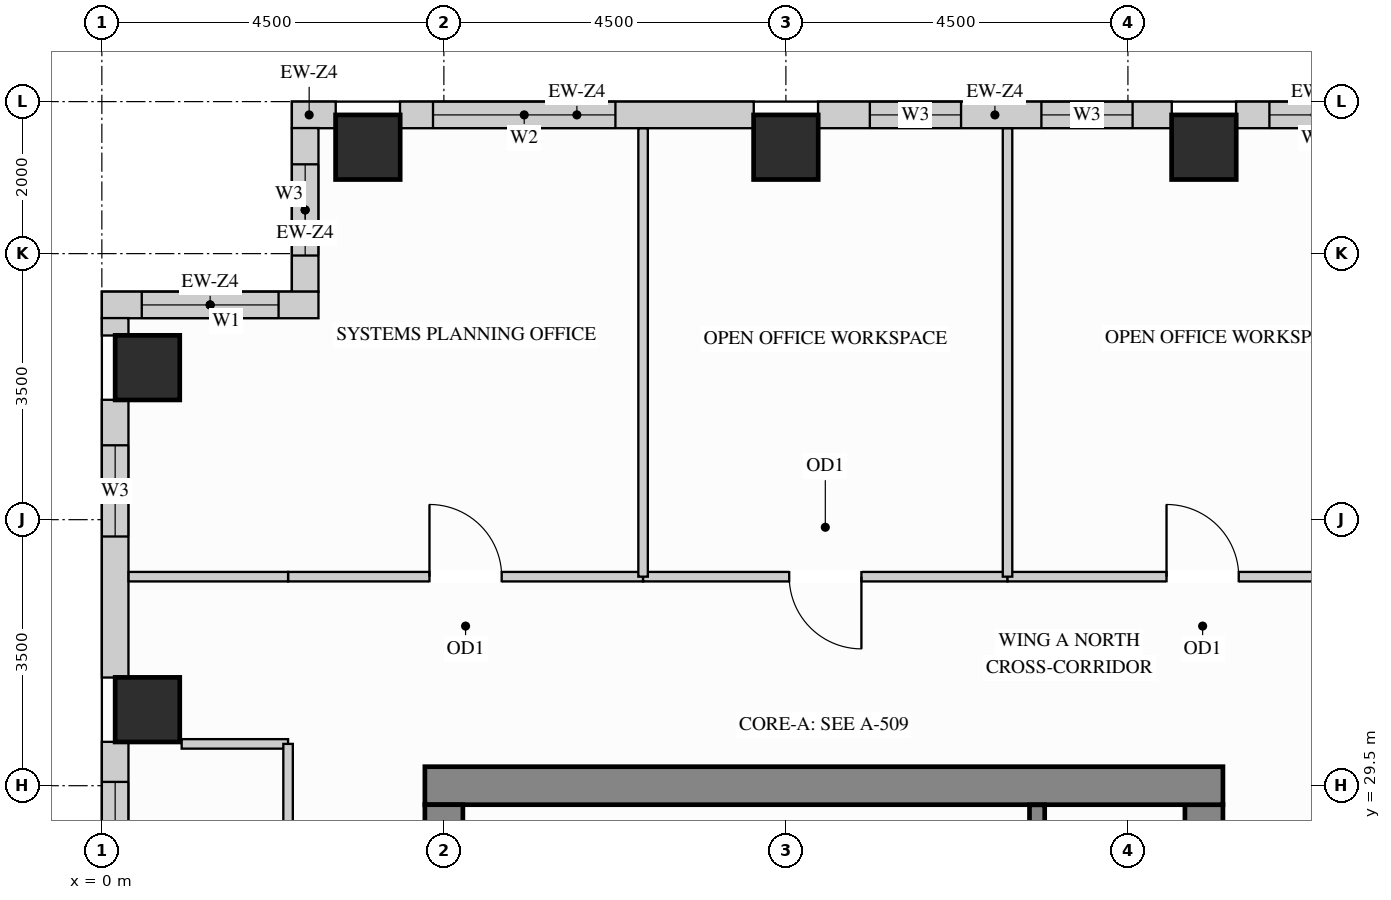
"""IFC4 building model, lengths in metres.
Left out: names, types, materials, properties, quantities, classifications, styles, units other than length and angle.
Written with IfcOpenShell. Run it as: python <this file> out.ifc"""

import sys

from ifc_helpers import new_model, si_unit, direction, frame, frame_2d, origin, origin_2d, place, context, subcontext, project, spatial, rectangle, extrude, source, transform, mapped, element, fill, save


model = new_model("IFC4")
c1 = context("Model", 3, precision=1e-05, world=origin(), true_north=direction((0.0, 1.0)))
c2 = subcontext(c1, "Body", "Model", "MODEL_VIEW")
j1 = project(units=[si_unit("LENGTHUNIT", "METRE"), si_unit("PLANEANGLEUNIT", "RADIAN")], contexts=[c1])
p1 = place(None, origin())
s1 = spatial("IfcSite", under=j1, at=p1, CompositionType="ELEMENT")
p2 = place(p1, origin())
s2 = spatial("IfcBuilding", under=s1, at=p2, CompositionType="ELEMENT")
p3 = place(p2, frame((0.0, 0.0, 237.6)))
s3 = spatial("IfcBuildingStorey", under=s2, at=p3, CompositionType="ELEMENT", Elevation=237.6)
m1 = source(origin(), c2, "Body", "SweptSolid", [
    extrude(rectangle(XDim=0.85, YDim=0.85, at=origin_2d()), origin(), (0.0, 0.0, 1.0), 3.4),
])
for number, where, z_axis, x_axis in (
    (1, (14.5, 37.9, 0.0), (0.0, 0.0, 1.0), (1.0, 0.0, 0.0)),
    (2, (3.5, 37.9, 0.0), (0.0, 0.0, 1.0), (1.0, 0.0, 0.0)),
    (3, (9.0, 37.9, 0.0), (0.0, 0.0, 1.0), (1.0, 0.0, 0.0)),
    (4, (0.6, 30.5, 0.0), (0.0, 0.0, 1.0), (1.0, 0.0, 0.0)),
    (5, (0.6, 35.0, 0.0), (0.0, 0.0, 1.0), (1.0, 0.0, 0.0)),
):
    element("IfcColumn", number, at=place(p3, frame(where, z_axis=z_axis, x_axis=x_axis)), inside=s3, PredefinedType="COLUMN", context=c2, shape_type="MappedRepresentation", body=[
        mapped(m1, transform((0.0, 0.0, 0.0), x_axis=(1.0, 0.0, 0.0), y_axis=(0.0, 1.0, 0.0), z_axis=(0.0, 0.0, 1.0))),
    ])
m2 = source(origin(), c2, "Body", "SweptSolid", [
    extrude(rectangle(XDim=8.37, YDim=0.5, at=frame_2d((4.185, 0.0))), origin(), (0.0, 0.0, 1.0), 3.4),
])
p4 = place(p3, frame((14.5, 20.88, 0.0), z_axis=(0.0, 0.0, 1.0), x_axis=(0.0, 1.0, 0.0)))
e6 = element("IfcWall", 6, at=p4, inside=s3, PredefinedType="SHEAR", context=c2, shape_type="MappedRepresentation", body=[
    mapped(m2, transform((0.0, 0.0, 0.0), x_axis=(1.0, 0.0, 0.0), y_axis=(0.0, 1.0, 0.0), z_axis=(0.0, 0.0, 1.0))),
])
m3 = source(origin(), c2, "Body", "SweptSolid", [
    extrude(rectangle(XDim=10.5, YDim=0.5, at=frame_2d((5.25, 0.0))), origin(), (0.0, 0.0, 1.0), 3.4),
])
p5 = place(p3, frame((4.25, 29.5, 0.0), z_axis=(0.0, 0.0, 1.0), x_axis=(1.0, 0.0, 0.0)))
e7 = element("IfcWall", 7, at=p5, inside=s3, PredefinedType="SHEAR", context=c2, shape_type="MappedRepresentation", body=[
    mapped(m3, transform((0.0, 0.0, 0.0), x_axis=(1.0, 0.0, 0.0), y_axis=(0.0, 1.0, 0.0), z_axis=(0.0, 0.0, 1.0))),
])
m4 = source(origin(), c2, "Body", "SweptSolid", [
    extrude(rectangle(XDim=20.5, YDim=0.5, at=frame_2d((10.25, 0.0))), origin(), (0.0, 0.0, 1.0), 3.4),
])
p6 = place(p3, frame((4.5, 8.75, 0.0), z_axis=(0.0, 0.0, 1.0), x_axis=(0.0, 1.0, 0.0)))
e8 = element("IfcWall", 8, at=p6, inside=s3, PredefinedType="SHEAR", context=c2, shape_type="MappedRepresentation", body=[
    mapped(m4, transform((0.0, 0.0, 0.0), x_axis=(1.0, 0.0, 0.0), y_axis=(0.0, 1.0, 0.0), z_axis=(0.0, 0.0, 1.0))),
])
p7 = place(p3, frame((17.0, 38.325, 0.0), z_axis=(0.0, 0.0, 1.0), x_axis=(-1.0, 0.0, 0.0)))
e9 = element("IfcWall", 9, at=p7, inside=s3, PredefinedType="SOLIDWALL", context=c2, shape_type="SweptSolid", body=[
    extrude(rectangle(XDim=2.077, YDim=0.35, at=frame_2d((1.039, 0.0))), origin(), (0.0, 0.0, 1.0), 3.385),
])
p8 = place(p7, frame((0.438, 0.0, 0.78)))
e10 = element("IfcOpeningElement", 10, at=p8, cuts=e9, PredefinedType="OPENING", context=c2, shape_type="SweptSolid", body=[
    extrude(rectangle(XDim=1.2, YDim=2.1, at=frame_2d((0.6, 1.05))), frame((0.0, 0.185, 0.0), z_axis=(0.0, -1.0, 0.0), x_axis=(1.0, 0.0, 0.0)), (0.0, 0.0, 1.0), 0.37),
])
p9 = place(p3, frame((14.077, 38.325, 0.0), z_axis=(0.0, 0.0, 1.0), x_axis=(-1.0, 0.0, 0.0)))
e11 = element("IfcWall", 11, at=p9, inside=s3, PredefinedType="SOLIDWALL", context=c2, shape_type="SweptSolid", body=[
    extrude(rectangle(XDim=4.654, YDim=0.35, at=frame_2d((2.327, 0.0))), origin(), (0.0, 0.0, 1.0), 3.385),
])
p10 = place(p9, frame((0.515, 0.0, 0.78)))
e12 = element("IfcOpeningElement", 12, at=p10, cuts=e11, PredefinedType="OPENING", context=c2, shape_type="SweptSolid", body=[
    extrude(rectangle(XDim=1.2, YDim=2.1, at=frame_2d((0.6, 1.05))), frame((0.0, 0.185, 0.0), z_axis=(0.0, -1.0, 0.0), x_axis=(1.0, 0.0, 0.0)), (0.0, 0.0, 1.0), 0.37),
])
p11 = place(p9, frame((2.772, 0.0, 0.78)))
e13 = element("IfcOpeningElement", 13, at=p11, cuts=e11, PredefinedType="OPENING", context=c2, shape_type="SweptSolid", body=[
    extrude(rectangle(XDim=1.2, YDim=2.1, at=frame_2d((0.6, 1.05))), frame((0.0, 0.185, 0.0), z_axis=(0.0, -1.0, 0.0), x_axis=(1.0, 0.0, 0.0)), (0.0, 0.0, 1.0), 0.37),
])
p12 = place(p3, frame((8.577, 38.325, 0.0), z_axis=(0.0, 0.0, 1.0), x_axis=(-1.0, 0.0, 0.0)))
e14 = element("IfcWall", 14, at=p12, inside=s3, PredefinedType="SOLIDWALL", context=c2, shape_type="SweptSolid", body=[
    extrude(rectangle(XDim=4.654, YDim=0.35, at=frame_2d((2.327, 0.0))), origin(), (0.0, 0.0, 1.0), 3.385),
])
p13 = place(p12, frame((1.82, 0.0, 0.78)))
e15 = element("IfcOpeningElement", 15, at=p13, cuts=e14, PredefinedType="OPENING", context=c2, shape_type="SweptSolid", body=[
    extrude(rectangle(XDim=2.4, YDim=2.1, at=frame_2d((1.2, 1.05))), frame((0.0, 0.185, 0.0), z_axis=(0.0, -1.0, 0.0), x_axis=(1.0, 0.0, 0.0)), (0.0, 0.0, 1.0), 0.37),
])
m5 = source(origin(), c2, "Body", "SweptSolid", [
    extrude(rectangle(XDim=0.577, YDim=0.35, at=frame_2d((0.289, 0.0))), origin(), (0.0, 0.0, 1.0), 3.385),
])
p14 = place(p3, frame((3.077, 38.325, 0.0), z_axis=(0.0, 0.0, 1.0), x_axis=(-1.0, 0.0, 0.0)))
e16 = element("IfcWall", 16, at=p14, inside=s3, PredefinedType="SOLIDWALL", context=c2, shape_type="MappedRepresentation", body=[
    mapped(m5, transform((0.0, 0.0, 0.0), x_axis=(1.0, 0.0, 0.0), y_axis=(0.0, 1.0, 0.0), z_axis=(0.0, 0.0, 1.0))),
])
p15 = place(p3, frame((2.675, 38.152, 0.0), z_axis=(0.0, 0.0, 1.0), x_axis=(0.0, -1.0, 0.0)))
e17 = element("IfcWall", 17, at=p15, inside=s3, PredefinedType="SOLIDWALL", context=c2, shape_type="SweptSolid", body=[
    extrude(rectangle(XDim=2.154, YDim=0.35, at=frame_2d((1.077, 0.0))), origin(), (0.0, 0.0, 1.0), 3.385),
])
p16 = place(p15, frame((0.477, 0.0, 0.78)))
e18 = element("IfcOpeningElement", 18, at=p16, cuts=e17, PredefinedType="OPENING", context=c2, shape_type="SweptSolid", body=[
    extrude(rectangle(XDim=1.2, YDim=2.1, at=frame_2d((0.6, 1.05))), frame((0.0, 0.185, 0.0), z_axis=(0.0, -1.0, 0.0), x_axis=(1.0, 0.0, 0.0)), (0.0, 0.0, 1.0), 0.37),
])
p17 = place(p3, frame((2.85, 35.825, 0.0), z_axis=(0.0, 0.0, 1.0), x_axis=(-1.0, 0.0, 0.0)))
e19 = element("IfcWall", 19, at=p17, inside=s3, PredefinedType="SOLIDWALL", context=c2, shape_type="SweptSolid", body=[
    extrude(rectangle(XDim=2.85, YDim=0.35, at=frame_2d((1.425, 0.0))), origin(), (0.0, 0.0, 1.0), 3.385),
])
p18 = place(p17, frame((0.525, 0.0, 0.78)))
e20 = element("IfcOpeningElement", 20, at=p18, cuts=e19, PredefinedType="OPENING", context=c2, shape_type="SweptSolid", body=[
    extrude(rectangle(XDim=1.8, YDim=2.1, at=frame_2d((0.9, 1.05))), frame((0.0, 0.185, 0.0), z_axis=(0.0, -1.0, 0.0), x_axis=(1.0, 0.0, 0.0)), (0.0, 0.0, 1.0), 0.37),
])
m6 = source(origin(), c2, "Body", "SweptSolid", [
    extrude(rectangle(XDim=0.229, YDim=0.35, at=frame_2d((0.115, 0.0))), origin(), (0.0, 0.0, 1.0), 3.385),
])
p19 = place(p3, frame((0.175, 35.652, 0.0), z_axis=(0.0, 0.0, 1.0), x_axis=(0.0, -1.0, 0.0)))
e21 = element("IfcWall", 21, at=p19, inside=s3, PredefinedType="SOLIDWALL", context=c2, shape_type="MappedRepresentation", body=[
    mapped(m6, transform((0.0, 0.0, 0.0), x_axis=(1.0, 0.0, 0.0), y_axis=(0.0, 1.0, 0.0), z_axis=(0.0, 0.0, 1.0))),
])
p20 = place(p3, frame((0.175, 34.577, 0.0), z_axis=(0.0, 0.0, 1.0), x_axis=(0.0, -1.0, 0.0)))
e22 = element("IfcWall", 22, at=p20, inside=s3, PredefinedType="SOLIDWALL", context=c2, shape_type="SweptSolid", body=[
    extrude(rectangle(XDim=3.654, YDim=0.35, at=frame_2d((1.827, 0.0))), origin(), (0.0, 0.0, 1.0), 3.385),
])
p21 = place(p20, frame((0.598, 0.0, 0.78)))
e23 = element("IfcOpeningElement", 23, at=p21, cuts=e22, PredefinedType="OPENING", context=c2, shape_type="SweptSolid", body=[
    extrude(rectangle(XDim=1.2, YDim=2.1, at=frame_2d((0.6, 1.05))), frame((0.0, 0.185, 0.0), z_axis=(0.0, -1.0, 0.0), x_axis=(1.0, 0.0, 0.0)), (0.0, 0.0, 1.0), 0.37),
])
p22 = place(p3, frame((0.175, 30.077, 0.0), z_axis=(0.0, 0.0, 1.0), x_axis=(0.0, -1.0, 0.0)))
e24 = element("IfcWall", 24, at=p22, inside=s3, PredefinedType="SOLIDWALL", context=c2, shape_type="SweptSolid", body=[
    extrude(rectangle(XDim=2.854, YDim=0.35, at=frame_2d((1.427, 0.0))), origin(), (0.0, 0.0, 1.0), 3.385),
])
p23 = place(p22, frame((0.527, 0.0, 0.78)))
e25 = element("IfcOpeningElement", 25, at=p23, cuts=e24, PredefinedType="OPENING", context=c2, shape_type="SweptSolid", body=[
    extrude(rectangle(XDim=1.8, YDim=2.1, at=frame_2d((0.9, 1.05))), frame((0.0, 0.185, 0.0), z_axis=(0.0, -1.0, 0.0), x_axis=(1.0, 0.0, 0.0)), (0.0, 0.0, 1.0), 0.37),
])
p24 = place(p3, frame((2.45, 32.25, 0.0), z_axis=(0.0, 0.0, 1.0), x_axis=(1.0, 0.0, 0.0)))
e26 = element("IfcWall", 26, at=p24, inside=s3, PredefinedType="PARTITIONING", context=c2, shape_type="SweptSolid", body=[
    extrude(rectangle(XDim=4.671, YDim=0.125, at=frame_2d((2.335, 0.0))), origin(), (0.0, 0.0, 1.0), 3.385),
])
p25 = place(p24, frame((1.861, 0.0, 0.0)))
e27 = element("IfcOpeningElement", 27, at=p25, cuts=e26, PredefinedType="OPENING", context=c2, shape_type="SweptSolid", body=[
    extrude(rectangle(XDim=0.95, YDim=2.15, at=frame_2d((0.475, 1.075))), frame((0.0, 0.073, 0.0), z_axis=(0.0, -1.0, 0.0), x_axis=(1.0, 0.0, 0.0)), (0.0, 0.0, 1.0), 0.145),
])
p26 = place(p3, frame((7.121, 32.25, 0.0), z_axis=(0.0, 0.0, 1.0), x_axis=(1.0, 0.0, 0.0)))
e28 = element("IfcWall", 28, at=p26, inside=s3, PredefinedType="PARTITIONING", context=c2, shape_type="SweptSolid", body=[
    extrude(rectangle(XDim=4.795, YDim=0.125, at=frame_2d((2.397, 0.0))), origin(), (0.0, 0.0, 1.0), 3.385),
])
p27 = place(p26, frame((1.923, 0.0, 0.0)))
e29 = element("IfcOpeningElement", 29, at=p27, cuts=e28, PredefinedType="OPENING", context=c2, shape_type="SweptSolid", body=[
    extrude(rectangle(XDim=0.95, YDim=2.15, at=frame_2d((0.475, 1.075))), frame((0.0, 0.073, 0.0), z_axis=(0.0, -1.0, 0.0), x_axis=(1.0, 0.0, 0.0)), (0.0, 0.0, 1.0), 0.145),
])
p28 = place(p3, frame((11.916, 32.25, 0.0), z_axis=(0.0, 0.0, 1.0), x_axis=(1.0, 0.0, 0.0)))
e30 = element("IfcWall", 30, at=p28, inside=s3, PredefinedType="PARTITIONING", context=c2, shape_type="SweptSolid", body=[
    extrude(rectangle(XDim=5.134, YDim=0.125, at=frame_2d((2.567, 0.0))), origin(), (0.0, 0.0, 1.0), 3.385),
])
p29 = place(p28, frame((2.092, 0.0, 0.0)))
e31 = element("IfcOpeningElement", 31, at=p29, cuts=e30, PredefinedType="OPENING", context=c2, shape_type="SweptSolid", body=[
    extrude(rectangle(XDim=0.95, YDim=2.15, at=frame_2d((0.475, 1.075))), frame((0.0, 0.073, 0.0), z_axis=(0.0, -1.0, 0.0), x_axis=(1.0, 0.0, 0.0)), (0.0, 0.0, 1.0), 0.145),
])
m7 = source(origin(), c2, "Body", "SweptSolid", [
    extrude(rectangle(XDim=2.098, YDim=0.125, at=frame_2d((1.049, 0.0))), origin(), (0.0, 0.0, 1.0), 3.385),
])
p30 = place(p3, frame((0.352, 32.25, 0.0), z_axis=(0.0, 0.0, 1.0), x_axis=(1.0, 0.0, 0.0)))
e32 = element("IfcWall", 32, at=p30, inside=s3, PredefinedType="PARTITIONING", context=c2, shape_type="MappedRepresentation", body=[
    mapped(m7, transform((0.0, 0.0, 0.0), x_axis=(1.0, 0.0, 0.0), y_axis=(0.0, 1.0, 0.0), z_axis=(0.0, 0.0, 1.0))),
])
m8 = source(origin(), c2, "Body", "SweptSolid", [
    extrude(rectangle(XDim=5.898, YDim=0.125, at=frame_2d((2.949, 0.0))), origin(), (0.0, 0.0, 1.0), 3.385),
])
for number, where, z_axis, x_axis in (
    (33, (7.121, 32.25, 0.0), (0.0, 0.0, 1.0), (0.0, 1.0, 0.0)),
    (34, (11.916, 32.25, 0.0), (0.0, 0.0, 1.0), (0.0, 1.0, 0.0)),
):
    element("IfcWall", number, at=place(p3, frame(where, z_axis=z_axis, x_axis=x_axis)), inside=s3, PredefinedType="PARTITIONING", context=c2, shape_type="MappedRepresentation", body=[
        mapped(m8, transform((0.0, 0.0, 0.0), x_axis=(1.0, 0.0, 0.0), y_axis=(0.0, 1.0, 0.0), z_axis=(0.0, 0.0, 1.0))),
    ])
m9 = source(origin(), c2, "Body", "SweptSolid", [
    extrude(rectangle(XDim=1.4, YDim=0.125, at=frame_2d((0.7, 0.0))), origin(), (0.0, 0.0, 1.0), 3.385),
])
p31 = place(p3, frame((1.05, 30.05, 0.0), z_axis=(0.0, 0.0, 1.0), x_axis=(1.0, 0.0, 0.0)))
e35 = element("IfcWall", 35, at=p31, inside=s3, PredefinedType="PARTITIONING", context=c2, shape_type="MappedRepresentation", body=[
    mapped(m9, transform((0.0, 0.0, 0.0), x_axis=(1.0, 0.0, 0.0), y_axis=(0.0, 1.0, 0.0), z_axis=(0.0, 0.0, 1.0))),
])
p32 = place(p3, frame((2.45, 22.6, 0.0), z_axis=(0.0, 0.0, 1.0), x_axis=(0.0, 1.0, 0.0)))
e36 = element("IfcWall", 36, at=p32, inside=s3, PredefinedType="PARTITIONING", context=c2, shape_type="SweptSolid", body=[
    extrude(rectangle(XDim=7.45, YDim=0.125, at=frame_2d((3.725, 0.0))), origin(), (0.0, 0.0, 1.0), 3.385),
])
p33 = place(p32, frame((3.25, 0.0, 0.0)))
e37 = element("IfcOpeningElement", 37, at=p33, cuts=e36, PredefinedType="OPENING", context=c2, shape_type="SweptSolid", body=[
    extrude(rectangle(XDim=0.95, YDim=2.15, at=frame_2d((0.475, 1.075))), frame((0.0, 0.073, 0.0), z_axis=(0.0, -1.0, 0.0), x_axis=(1.0, 0.0, 0.0)), (0.0, 0.0, 1.0), 0.145),
])
m10 = source(origin(), c2, "Body", "SweptSolid", [
    extrude(rectangle(XDim=3.803, YDim=0.2, at=frame_2d((1.901, 0.0))), origin(), (0.0, 0.0, 1.0), 3.4),
])
p34 = place(p3, frame((12.305, 25.445, 0.0), z_axis=(0.0, 0.0, 1.0), x_axis=(0.0, 1.0, 0.0)))
e38 = element("IfcWall", 38, at=p34, inside=s3, PredefinedType="SHEAR", context=c2, shape_type="MappedRepresentation", body=[
    mapped(m10, transform((0.0, 0.0, 0.0), x_axis=(1.0, 0.0, 0.0), y_axis=(0.0, 1.0, 0.0), z_axis=(0.0, 0.0, 1.0))),
])
m11 = source(origin(), c2, "Body", "SweptSolid", [
    extrude(rectangle(XDim=0.95, YDim=2.15, at=frame_2d((0.475, 1.075))), frame((0.0, 0.025, 0.0), z_axis=(0.0, -1.0, 0.0), x_axis=(1.0, 0.0, 0.0)), (0.0, 0.0, 1.0), 0.05),
])
p35 = place(p25, origin())
e39 = element("IfcDoor", 39, at=p35, inside=s3, OperationType="SINGLE_SWING_LEFT", PredefinedType="DOOR", context=c2, shape_type="MappedRepresentation", body=[
    mapped(m11, transform((0.0, 0.0, 0.0), x_axis=(1.0, 0.0, 0.0), y_axis=(0.0, 1.0, 0.0), z_axis=(0.0, 0.0, 1.0))),
])
fill(e27, e39)
p36 = place(p27, origin())
e40 = element("IfcDoor", 40, at=p36, inside=s3, OperationType="SINGLE_SWING_RIGHT", PredefinedType="DOOR", context=c2, shape_type="MappedRepresentation", body=[
    mapped(m11, transform((0.0, 0.0, 0.0), x_axis=(1.0, 0.0, 0.0), y_axis=(0.0, 1.0, 0.0), z_axis=(0.0, 0.0, 1.0))),
])
fill(e29, e40)
p37 = place(p29, origin())
e41 = element("IfcDoor", 41, at=p37, inside=s3, OperationType="SINGLE_SWING_LEFT", PredefinedType="DOOR", context=c2, shape_type="MappedRepresentation", body=[
    mapped(m11, transform((0.0, 0.0, 0.0), x_axis=(1.0, 0.0, 0.0), y_axis=(0.0, 1.0, 0.0), z_axis=(0.0, 0.0, 1.0))),
])
fill(e31, e41)
m12 = source(origin(), c2, "Body", "SweptSolid", [
    extrude(rectangle(XDim=1.8, YDim=2.1, at=frame_2d((0.9, 1.05))), frame((0.0, 0.03, 0.0), z_axis=(0.0, -1.0, 0.0), x_axis=(1.0, 0.0, 0.0)), (0.0, 0.0, 1.0), 0.06),
])
p38 = place(p18, origin())
e42 = element("IfcWindow", 42, at=p38, inside=s3, PartitioningType="SINGLE_PANEL", PredefinedType="WINDOW", context=c2, shape_type="MappedRepresentation", body=[
    mapped(m12, transform((0.0, 0.0, 0.0), x_axis=(1.0, 0.0, 0.0), y_axis=(0.0, 1.0, 0.0), z_axis=(0.0, 0.0, 1.0))),
])
fill(e20, e42)
p39 = place(p23, origin())
e43 = element("IfcWindow", 43, at=p39, inside=s3, PartitioningType="SINGLE_PANEL", PredefinedType="WINDOW", context=c2, shape_type="MappedRepresentation", body=[
    mapped(m12, transform((0.0, 0.0, 0.0), x_axis=(1.0, 0.0, 0.0), y_axis=(0.0, 1.0, 0.0), z_axis=(0.0, 0.0, 1.0))),
])
fill(e25, e43)
m13 = source(origin(), c2, "Body", "SweptSolid", [
    extrude(rectangle(XDim=2.4, YDim=2.1, at=frame_2d((1.2, 1.05))), frame((0.0, 0.03, 0.0), z_axis=(0.0, -1.0, 0.0), x_axis=(1.0, 0.0, 0.0)), (0.0, 0.0, 1.0), 0.06),
])
p40 = place(p13, origin())
e44 = element("IfcWindow", 44, at=p40, inside=s3, PartitioningType="SINGLE_PANEL", PredefinedType="WINDOW", context=c2, shape_type="MappedRepresentation", body=[
    mapped(m13, transform((0.0, 0.0, 0.0), x_axis=(1.0, 0.0, 0.0), y_axis=(0.0, 1.0, 0.0), z_axis=(0.0, 0.0, 1.0))),
])
fill(e15, e44)
m14 = source(origin(), c2, "Body", "SweptSolid", [
    extrude(rectangle(XDim=1.2, YDim=2.1, at=frame_2d((0.6, 1.05))), frame((0.0, 0.03, 0.0), z_axis=(0.0, -1.0, 0.0), x_axis=(1.0, 0.0, 0.0)), (0.0, 0.0, 1.0), 0.06),
])
p41 = place(p8, origin())
e45 = element("IfcWindow", 45, at=p41, inside=s3, PartitioningType="SINGLE_PANEL", PredefinedType="WINDOW", context=c2, shape_type="MappedRepresentation", body=[
    mapped(m14, transform((0.0, 0.0, 0.0), x_axis=(1.0, 0.0, 0.0), y_axis=(0.0, 1.0, 0.0), z_axis=(0.0, 0.0, 1.0))),
])
fill(e10, e45)
p42 = place(p10, origin())
e46 = element("IfcWindow", 46, at=p42, inside=s3, PartitioningType="SINGLE_PANEL", PredefinedType="WINDOW", context=c2, shape_type="MappedRepresentation", body=[
    mapped(m14, transform((0.0, 0.0, 0.0), x_axis=(1.0, 0.0, 0.0), y_axis=(0.0, 1.0, 0.0), z_axis=(0.0, 0.0, 1.0))),
])
fill(e12, e46)
p43 = place(p11, origin())
e47 = element("IfcWindow", 47, at=p43, inside=s3, PartitioningType="SINGLE_PANEL", PredefinedType="WINDOW", context=c2, shape_type="MappedRepresentation", body=[
    mapped(m14, transform((0.0, 0.0, 0.0), x_axis=(1.0, 0.0, 0.0), y_axis=(0.0, 1.0, 0.0), z_axis=(0.0, 0.0, 1.0))),
])
fill(e13, e47)
p44 = place(p16, origin())
e48 = element("IfcWindow", 48, at=p44, inside=s3, PartitioningType="SINGLE_PANEL", PredefinedType="WINDOW", context=c2, shape_type="MappedRepresentation", body=[
    mapped(m14, transform((0.0, 0.0, 0.0), x_axis=(1.0, 0.0, 0.0), y_axis=(0.0, 1.0, 0.0), z_axis=(0.0, 0.0, 1.0))),
])
fill(e18, e48)
p45 = place(p21, origin())
e49 = element("IfcWindow", 49, at=p45, inside=s3, PartitioningType="SINGLE_PANEL", PredefinedType="WINDOW", context=c2, shape_type="MappedRepresentation", body=[
    mapped(m14, transform((0.0, 0.0, 0.0), x_axis=(1.0, 0.0, 0.0), y_axis=(0.0, 1.0, 0.0), z_axis=(0.0, 0.0, 1.0))),
])
fill(e23, e49)
save(model, sys.argv[1])
